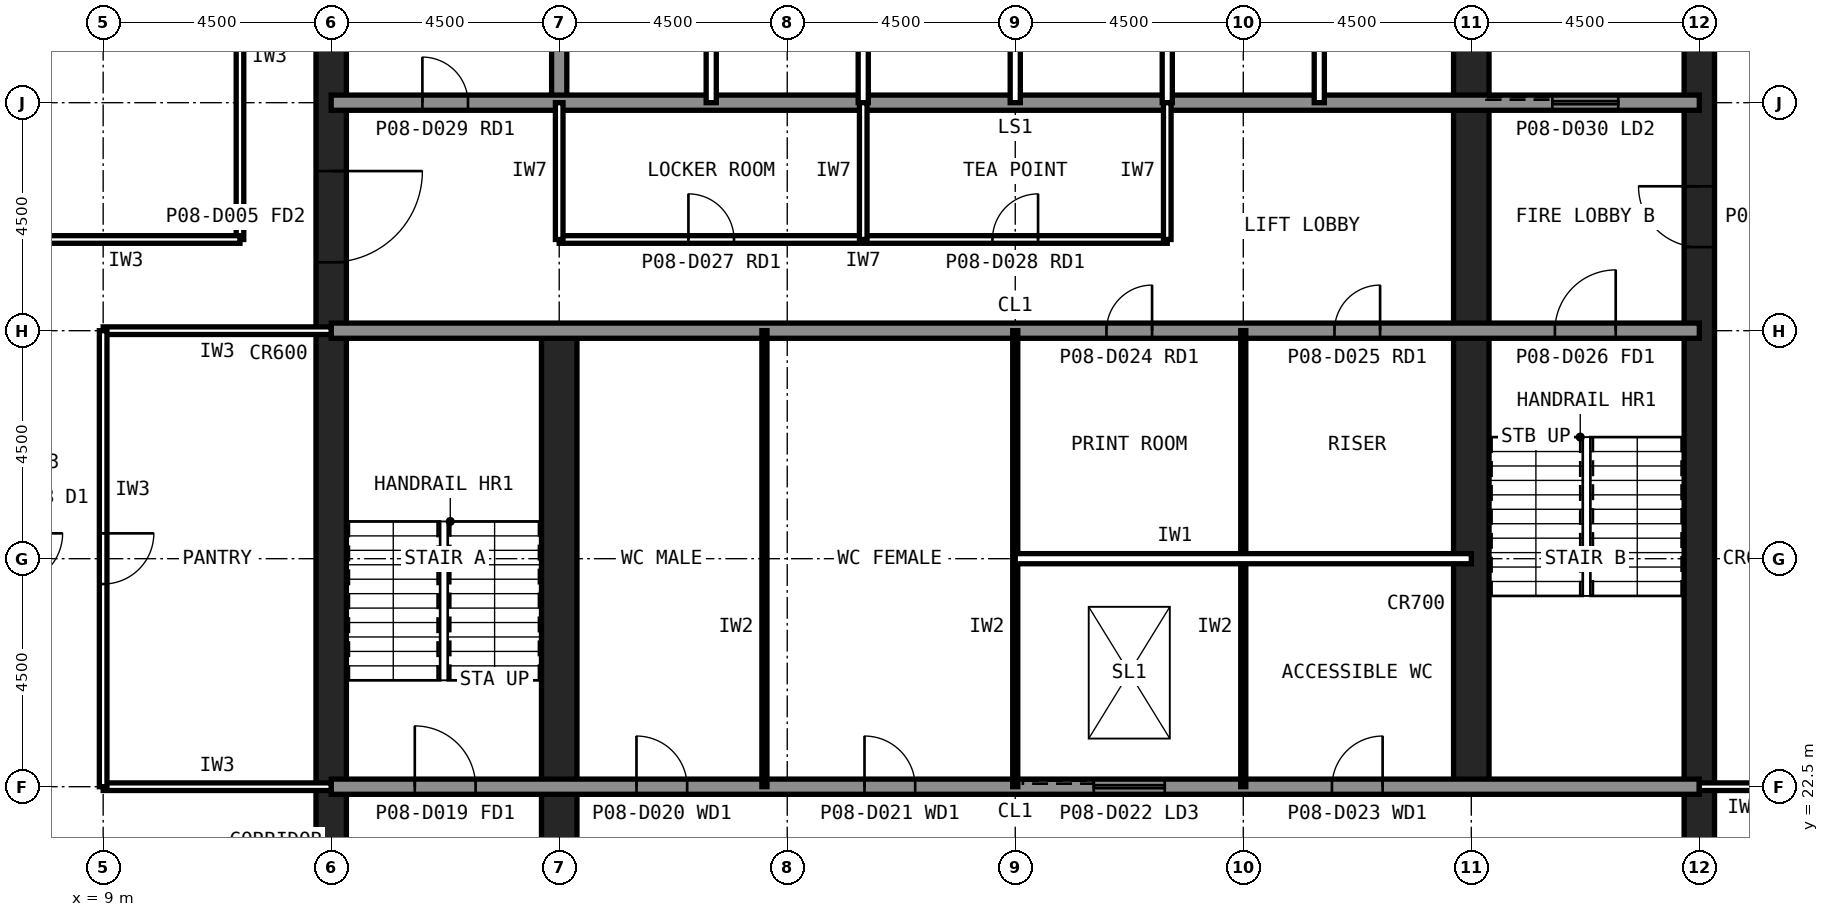
"""IFC4 building model, lengths in metres.
Left out: names, types, materials, properties, quantities, classifications, styles, units other than length and angle.
Written with IfcOpenShell. Run it as: python <this file> out.ifc"""

import sys

from ifc_helpers import new_model, si_unit, direction, frame, frame_2d, origin, place, context, subcontext, project, spatial, rectangle, extrude, element, fill, save


model = new_model("IFC4")
c1 = context("Model", 3, precision=1e-05, world=origin(), true_north=direction((0.0, 1.0)))
c2 = subcontext(c1, "Body", "Model", "MODEL_VIEW")
j1 = project(units=[si_unit("LENGTHUNIT", "METRE"), si_unit("PLANEANGLEUNIT", "RADIAN")], contexts=[c1])
p1 = place(None, origin())
s1 = spatial("IfcSite", under=j1, at=p1, CompositionType="ELEMENT")
p2 = place(p1, origin())
s2 = spatial("IfcBuilding", under=s1, at=p2, CompositionType="ELEMENT")
p3 = place(p2, frame((0.0, 0.0, 37.4)))
s3 = spatial("IfcBuildingStorey", under=s2, at=p3, CompositionType="ELEMENT", Elevation=37.4)
p4 = place(p3, frame((40.5, 13.5, 0.0), z_axis=(0.0, 0.0, 1.0), x_axis=(0.0, 1.0, 0.0)))
e1 = element("IfcWall", 1, at=p4, inside=s3, PredefinedType="SHEAR", context=c2, shape_type="SweptSolid", body=[
    extrude(rectangle(XDim=27.0, YDim=0.6, at=frame_2d((13.5, 0.0))), origin(), (0.0, 0.0, 1.0), 4.2),
])
p5 = place(p4, frame((5.85, 0.0, 0.0)))
e2 = element("IfcOpeningElement", 2, at=p5, cuts=e1, PredefinedType="OPENING", context=c2, shape_type="SweptSolid", body=[
    extrude(rectangle(XDim=1.8, YDim=2.1, at=frame_2d((0.9, 1.05))), frame((0.0, 0.31, 0.0), z_axis=(0.0, -1.0, 0.0), x_axis=(1.0, 0.0, 0.0)), (0.0, 0.0, 1.0), 0.62),
])
p6 = place(p4, frame((19.65, 0.0, 0.0)))
e3 = element("IfcOpeningElement", 3, at=p6, cuts=e1, PredefinedType="OPENING", context=c2, shape_type="SweptSolid", body=[
    extrude(rectangle(XDim=1.2, YDim=2.1, at=frame_2d((0.6, 1.05))), frame((0.0, 0.31, 0.0), z_axis=(0.0, -1.0, 0.0), x_axis=(1.0, 0.0, 0.0)), (0.0, 0.0, 1.0), 0.62),
])
p7 = place(p3, frame((13.5, 40.5, 0.0), z_axis=(0.0, 0.0, 1.0), x_axis=(0.0, -1.0, 0.0)))
e4 = element("IfcWall", 4, at=p7, inside=s3, PredefinedType="SHEAR", context=c2, shape_type="SweptSolid", body=[
    extrude(rectangle(XDim=27.0, YDim=0.6, at=frame_2d((13.5, 0.0))), origin(), (0.0, 0.0, 1.0), 4.2),
])
p8 = place(p7, frame((19.65, 0.0, 0.0)))
e5 = element("IfcOpeningElement", 5, at=p8, cuts=e4, PredefinedType="OPENING", context=c2, shape_type="SweptSolid", body=[
    extrude(rectangle(XDim=1.2, YDim=2.1, at=frame_2d((0.6, 1.05))), frame((0.0, 0.31, 0.0), z_axis=(0.0, -1.0, 0.0), x_axis=(1.0, 0.0, 0.0)), (0.0, 0.0, 1.0), 0.62),
])
p9 = place(p7, frame((5.85, 0.0, 0.0)))
e6 = element("IfcOpeningElement", 6, at=p9, cuts=e4, PredefinedType="OPENING", context=c2, shape_type="SweptSolid", body=[
    extrude(rectangle(XDim=1.8, YDim=2.1, at=frame_2d((0.9, 1.05))), frame((0.0, 0.31, 0.0), z_axis=(0.0, -1.0, 0.0), x_axis=(1.0, 0.0, 0.0)), (0.0, 0.0, 1.0), 0.62),
])
p10 = place(p3, frame((18.0, 13.5, 0.0), z_axis=(0.0, 0.0, 1.0), x_axis=(0.0, 1.0, 0.0)))
e7 = element("IfcWall", 7, at=p10, inside=s3, PredefinedType="SHEAR", context=c2, shape_type="SweptSolid", body=[
    extrude(rectangle(XDim=18.0, YDim=0.7, at=frame_2d((9.0, 0.0))), origin(), (0.0, 0.0, 1.0), 4.2),
])
p11 = place(p3, frame((18.0, 36.0, 0.0), z_axis=(0.0, 0.0, 1.0), x_axis=(0.0, 1.0, 0.0)))
e8 = element("IfcWall", 8, at=p11, inside=s3, PredefinedType="SOLIDWALL", context=c2, shape_type="SweptSolid", body=[
    extrude(rectangle(XDim=4.5, YDim=0.3, at=frame_2d((2.25, 0.0))), origin(), (0.0, 0.0, 1.0), 4.04),
])
p12 = place(p3, frame((36.0, 22.5, 0.0), z_axis=(0.0, 0.0, 1.0), x_axis=(0.0, 1.0, 0.0)))
e9 = element("IfcWall", 9, at=p12, inside=s3, PredefinedType="SHEAR", context=c2, shape_type="SweptSolid", body=[
    extrude(rectangle(XDim=18.0, YDim=0.7, at=frame_2d((9.0, 0.0))), origin(), (0.0, 0.0, 1.0), 4.2),
])
p13 = place(p3, frame((13.5, 36.0, 0.0), z_axis=(0.0, 0.0, 1.0), x_axis=(1.0, 0.0, 0.0)))
e10 = element("IfcWall", 10, at=p13, inside=s3, PredefinedType="SOLIDWALL", context=c2, shape_type="SweptSolid", body=[
    extrude(rectangle(XDim=27.0, YDim=0.3, at=frame_2d((13.5, 0.0))), origin(), (0.0, 0.0, 1.0), 4.04),
])
p14 = place(p13, frame((1.8, 0.0, 0.0)))
e11 = element("IfcOpeningElement", 11, at=p14, cuts=e10, PredefinedType="OPENING", context=c2, shape_type="SweptSolid", body=[
    extrude(rectangle(XDim=0.9, YDim=2.1, at=frame_2d((0.45, 1.05))), frame((0.0, 0.16, 0.0), z_axis=(0.0, -1.0, 0.0), x_axis=(1.0, 0.0, 0.0)), (0.0, 0.0, 1.0), 0.32),
])
p15 = place(p13, frame((24.1, 0.0, 0.0)))
e12 = element("IfcOpeningElement", 12, at=p15, cuts=e10, PredefinedType="OPENING", context=c2, shape_type="SweptSolid", body=[
    extrude(rectangle(XDim=1.3, YDim=2.2, at=frame_2d((0.65, 1.1))), frame((0.0, 0.16, 0.0), z_axis=(0.0, -1.0, 0.0), x_axis=(1.0, 0.0, 0.0)), (0.0, 0.0, 1.0), 0.32),
])
p16 = place(p3, frame((13.5, 22.5, 0.0), z_axis=(0.0, 0.0, 1.0), x_axis=(1.0, 0.0, 0.0)))
e13 = element("IfcWall", 13, at=p16, inside=s3, PredefinedType="SOLIDWALL", context=c2, shape_type="SweptSolid", body=[
    extrude(rectangle(XDim=27.0, YDim=0.3, at=frame_2d((13.5, 0.0))), origin(), (0.0, 0.0, 1.0), 4.04),
])
p17 = place(p16, frame((1.65, 0.0, 0.0)))
e14 = element("IfcOpeningElement", 14, at=p17, cuts=e13, PredefinedType="OPENING", context=c2, shape_type="SweptSolid", body=[
    extrude(rectangle(XDim=1.2, YDim=2.1, at=frame_2d((0.6, 1.05))), frame((0.0, 0.16, 0.0), z_axis=(0.0, -1.0, 0.0), x_axis=(1.0, 0.0, 0.0)), (0.0, 0.0, 1.0), 0.32),
])
p18 = place(p16, frame((6.025, 0.0, 0.0)))
e15 = element("IfcOpeningElement", 15, at=p18, cuts=e13, PredefinedType="OPENING", context=c2, shape_type="SweptSolid", body=[
    extrude(rectangle(XDim=1.0, YDim=2.1, at=frame_2d((0.5, 1.05))), frame((0.0, 0.16, 0.0), z_axis=(0.0, -1.0, 0.0), x_axis=(1.0, 0.0, 0.0)), (0.0, 0.0, 1.0), 0.32),
])
p19 = place(p16, frame((10.525, 0.0, 0.0)))
e16 = element("IfcOpeningElement", 16, at=p19, cuts=e13, PredefinedType="OPENING", context=c2, shape_type="SweptSolid", body=[
    extrude(rectangle(XDim=1.0, YDim=2.1, at=frame_2d((0.5, 1.05))), frame((0.0, 0.16, 0.0), z_axis=(0.0, -1.0, 0.0), x_axis=(1.0, 0.0, 0.0)), (0.0, 0.0, 1.0), 0.32),
])
p20 = place(p16, frame((19.75, 0.0, 0.0)))
e17 = element("IfcOpeningElement", 17, at=p20, cuts=e13, PredefinedType="OPENING", context=c2, shape_type="SweptSolid", body=[
    extrude(rectangle(XDim=1.0, YDim=2.1, at=frame_2d((0.5, 1.05))), frame((0.0, 0.16, 0.0), z_axis=(0.0, -1.0, 0.0), x_axis=(1.0, 0.0, 0.0)), (0.0, 0.0, 1.0), 0.32),
])
p21 = place(p16, frame((15.05, 0.0, 0.0)))
e18 = element("IfcOpeningElement", 18, at=p21, cuts=e13, PredefinedType="OPENING", context=c2, shape_type="SweptSolid", body=[
    extrude(rectangle(XDim=1.4, YDim=2.4, at=frame_2d((0.7, 1.2))), frame((0.0, 0.16, 0.0), z_axis=(0.0, -1.0, 0.0), x_axis=(1.0, 0.0, 0.0)), (0.0, 0.0, 1.0), 0.32),
])
p22 = place(p3, frame((13.5, 31.5, 0.0), z_axis=(0.0, 0.0, 1.0), x_axis=(1.0, 0.0, 0.0)))
e19 = element("IfcWall", 19, at=p22, inside=s3, PredefinedType="SOLIDWALL", context=c2, shape_type="SweptSolid", body=[
    extrude(rectangle(XDim=27.0, YDim=0.3, at=frame_2d((13.5, 0.0))), origin(), (0.0, 0.0, 1.0), 4.04),
])
p23 = place(p22, frame((24.15, 0.0, 0.0)))
e20 = element("IfcOpeningElement", 20, at=p23, cuts=e19, PredefinedType="OPENING", context=c2, shape_type="SweptSolid", body=[
    extrude(rectangle(XDim=1.2, YDim=2.1, at=frame_2d((0.6, 1.05))), frame((0.0, 0.16, 0.0), z_axis=(0.0, -1.0, 0.0), x_axis=(1.0, 0.0, 0.0)), (0.0, 0.0, 1.0), 0.32),
])
p24 = place(p22, frame((15.3, 0.0, 0.0)))
e21 = element("IfcOpeningElement", 21, at=p24, cuts=e19, PredefinedType="OPENING", context=c2, shape_type="SweptSolid", body=[
    extrude(rectangle(XDim=0.9, YDim=2.1, at=frame_2d((0.45, 1.05))), frame((0.0, 0.16, 0.0), z_axis=(0.0, -1.0, 0.0), x_axis=(1.0, 0.0, 0.0)), (0.0, 0.0, 1.0), 0.32),
])
p25 = place(p22, frame((19.8, 0.0, 0.0)))
e22 = element("IfcOpeningElement", 22, at=p25, cuts=e19, PredefinedType="OPENING", context=c2, shape_type="SweptSolid", body=[
    extrude(rectangle(XDim=0.9, YDim=2.1, at=frame_2d((0.45, 1.05))), frame((0.0, 0.16, 0.0), z_axis=(0.0, -1.0, 0.0), x_axis=(1.0, 0.0, 0.0)), (0.0, 0.0, 1.0), 0.32),
])
for number, where, z_axis, x_axis in (
    (23, (21.0, 36.0, 0.0), (0.0, 0.0, 1.0), (0.0, 1.0, 0.0)),
    (24, (24.0, 36.0, 0.0), (0.0, 0.0, 1.0), (0.0, 1.0, 0.0)),
    (25, (27.0, 36.0, 0.0), (0.0, 0.0, 1.0), (0.0, 1.0, 0.0)),
    (26, (30.0, 36.0, 0.0), (0.0, 0.0, 1.0), (0.0, 1.0, 0.0)),
    (27, (33.0, 36.0, 0.0), (0.0, 0.0, 1.0), (0.0, 1.0, 0.0)),
):
    element("IfcWall", number, at=place(p3, frame(where, z_axis=z_axis, x_axis=x_axis)), inside=s3, PredefinedType="PARTITIONING", context=c2, shape_type="SweptSolid", body=[
        extrude(rectangle(XDim=4.5, YDim=0.2, at=frame_2d((2.25, 0.0))), origin(), (0.0, 0.0, 1.0), 4.04),
    ])
for number, where, z_axis, x_axis in (
    (28, (22.05, 22.5, 0.0), (0.0, 0.0, 1.0), (0.0, 1.0, 0.0)),
    (29, (27.0, 22.5, 0.0), (0.0, 0.0, 1.0), (0.0, 1.0, 0.0)),
    (30, (31.5, 22.5, 0.0), (0.0, 0.0, 1.0), (0.0, 1.0, 0.0)),
):
    element("IfcWall", number, at=place(p3, frame(where, z_axis=z_axis, x_axis=x_axis)), inside=s3, PredefinedType="PLUMBINGWALL", context=c2, shape_type="SweptSolid", body=[
        extrude(rectangle(XDim=9.0, YDim=0.1, at=frame_2d((4.5, 0.0))), origin(), (0.0, 0.0, 1.0), 4.04),
    ])
p26 = place(p3, frame((27.0, 27.0, 0.0), z_axis=(0.0, 0.0, 1.0), x_axis=(1.0, 0.0, 0.0)))
e31 = element("IfcWall", 31, at=p26, inside=s3, PredefinedType="PARTITIONING", context=c2, shape_type="SweptSolid", body=[
    extrude(rectangle(XDim=9.0, YDim=0.2, at=frame_2d((4.5, 0.0))), origin(), (0.0, 0.0, 1.0), 4.04),
])
p27 = place(p3, frame((18.0, 33.3, 0.0), z_axis=(0.0, 0.0, 1.0), x_axis=(1.0, 0.0, 0.0)))
e32 = element("IfcWall", 32, at=p27, inside=s3, PredefinedType="PARTITIONING", context=c2, shape_type="SweptSolid", body=[
    extrude(rectangle(XDim=12.0, YDim=0.15, at=frame_2d((6.0, 0.0))), origin(), (0.0, 0.0, 1.0), 4.04),
])
p28 = place(p27, frame((2.55, 0.0, 0.0)))
e33 = element("IfcOpeningElement", 33, at=p28, cuts=e32, PredefinedType="OPENING", context=c2, shape_type="SweptSolid", body=[
    extrude(rectangle(XDim=0.9, YDim=2.1, at=frame_2d((0.45, 1.05))), frame((0.0, 0.085, 0.0), z_axis=(0.0, -1.0, 0.0), x_axis=(1.0, 0.0, 0.0)), (0.0, 0.0, 1.0), 0.17),
])
p29 = place(p27, frame((8.55, 0.0, 0.0)))
e34 = element("IfcOpeningElement", 34, at=p29, cuts=e32, PredefinedType="OPENING", context=c2, shape_type="SweptSolid", body=[
    extrude(rectangle(XDim=0.9, YDim=2.1, at=frame_2d((0.45, 1.05))), frame((0.0, 0.085, 0.0), z_axis=(0.0, -1.0, 0.0), x_axis=(1.0, 0.0, 0.0)), (0.0, 0.0, 1.0), 0.17),
])
for number, where, z_axis, x_axis in (
    (35, (18.0, 33.3, 0.0), (0.0, 0.0, 1.0), (0.0, 1.0, 0.0)),
    (36, (24.0, 33.3, 0.0), (0.0, 0.0, 1.0), (0.0, 1.0, 0.0)),
    (37, (30.0, 33.3, 0.0), (0.0, 0.0, 1.0), (0.0, 1.0, 0.0)),
):
    element("IfcWall", number, at=place(p3, frame(where, z_axis=z_axis, x_axis=x_axis)), inside=s3, PredefinedType="PARTITIONING", context=c2, shape_type="SweptSolid", body=[
        extrude(rectangle(XDim=2.7, YDim=0.15, at=frame_2d((1.35, 0.0))), origin(), (0.0, 0.0, 1.0), 4.04),
    ])
p30 = place(p3, frame((11.7, 40.5, 0.0), z_axis=(0.0, 0.0, 1.0), x_axis=(0.0, -1.0, 0.0)))
e38 = element("IfcWall", 38, at=p30, inside=s3, PredefinedType="PARTITIONING", context=c2, shape_type="SweptSolid", body=[
    extrude(rectangle(XDim=7.2, YDim=0.15, at=frame_2d((3.6, 0.0))), origin(), (0.0, 0.0, 1.0), 4.04),
])
p31 = place(p3, frame((11.7, 33.3, 0.0), z_axis=(0.0, 0.0, 1.0), x_axis=(-1.0, 0.0, 0.0)))
e39 = element("IfcWall", 39, at=p31, inside=s3, PredefinedType="PARTITIONING", context=c2, shape_type="SweptSolid", body=[
    extrude(rectangle(XDim=4.5, YDim=0.15, at=frame_2d((2.25, 0.0))), origin(), (0.0, 0.0, 1.0), 4.04),
])
p32 = place(p3, frame((42.3, 22.5, 0.0), z_axis=(0.0, 0.0, 1.0), x_axis=(-1.0, 0.0, 0.0)))
e40 = element("IfcWall", 40, at=p32, inside=s3, PredefinedType="PARTITIONING", context=c2, shape_type="SweptSolid", body=[
    extrude(rectangle(XDim=1.8, YDim=0.15, at=frame_2d((0.9, 0.0))), origin(), (0.0, 0.0, 1.0), 3.189),
])
for number, where, z_axis, x_axis in (
    (41, (9.0, 22.5, 0.0), (0.0, 0.0, 1.0), (1.0, 0.0, 0.0)),
    (42, (13.5, 31.5, 0.0), (0.0, 0.0, 1.0), (-1.0, 0.0, 0.0)),
):
    element("IfcWall", number, at=place(p3, frame(where, z_axis=z_axis, x_axis=x_axis)), inside=s3, PredefinedType="PARTITIONING", context=c2, shape_type="SweptSolid", body=[
        extrude(rectangle(XDim=4.5, YDim=0.15, at=frame_2d((2.25, 0.0))), origin(), (0.0, 0.0, 1.0), 3.189),
    ])
p33 = place(p3, frame((9.0, 31.5, 0.0), z_axis=(0.0, 0.0, 1.0), x_axis=(0.0, -1.0, 0.0)))
e43 = element("IfcWall", 43, at=p33, inside=s3, PredefinedType="PARTITIONING", context=c2, shape_type="SweptSolid", body=[
    extrude(rectangle(XDim=9.0, YDim=0.15, at=frame_2d((4.5, 0.0))), origin(), (0.0, 0.0, 1.0), 4.04),
])
p34 = place(p33, frame((4.0, 0.0, 0.0)))
e44 = element("IfcOpeningElement", 44, at=p34, cuts=e43, PredefinedType="OPENING", context=c2, shape_type="SweptSolid", body=[
    extrude(rectangle(XDim=1.0, YDim=2.1, at=frame_2d((0.5, 1.05))), frame((0.0, 0.085, 0.0), z_axis=(0.0, -1.0, 0.0), x_axis=(1.0, 0.0, 0.0)), (0.0, 0.0, 1.0), 0.17),
])
p35 = place(p9, origin())
e45 = element("IfcDoor", 45, at=p35, inside=s3, OperationType="SINGLE_SWING_LEFT", PredefinedType="DOOR", context=c2, shape_type="SweptSolid", body=[
    extrude(rectangle(XDim=1.8, YDim=2.1, at=frame_2d((0.9, 1.05))), frame((0.0, 0.025, 0.0), z_axis=(0.0, -1.0, 0.0), x_axis=(1.0, 0.0, 0.0)), (0.0, 0.0, 1.0), 0.05),
])
fill(e6, e45)
p36 = place(p6, origin())
e46 = element("IfcDoor", 46, at=p36, inside=s3, OperationType="SINGLE_SWING_RIGHT", PredefinedType="DOOR", context=c2, shape_type="SweptSolid", body=[
    extrude(rectangle(XDim=1.2, YDim=2.1, at=frame_2d((0.6, 1.05))), frame((0.0, 0.025, 0.0), z_axis=(0.0, -1.0, 0.0), x_axis=(1.0, 0.0, 0.0)), (0.0, 0.0, 1.0), 0.05),
])
fill(e3, e46)
p37 = place(p17, origin())
e47 = element("IfcDoor", 47, at=p37, inside=s3, OperationType="SINGLE_SWING_LEFT", PredefinedType="DOOR", context=c2, shape_type="SweptSolid", body=[
    extrude(rectangle(XDim=1.2, YDim=2.1, at=frame_2d((0.6, 1.05))), frame((0.0, 0.025, 0.0), z_axis=(0.0, -1.0, 0.0), x_axis=(1.0, 0.0, 0.0)), (0.0, 0.0, 1.0), 0.05),
])
fill(e14, e47)
p38 = place(p23, origin())
e48 = element("IfcDoor", 48, at=p38, inside=s3, OperationType="SINGLE_SWING_RIGHT", PredefinedType="DOOR", context=c2, shape_type="SweptSolid", body=[
    extrude(rectangle(XDim=1.2, YDim=2.1, at=frame_2d((0.6, 1.05))), frame((0.0, 0.025, 0.0), z_axis=(0.0, -1.0, 0.0), x_axis=(1.0, 0.0, 0.0)), (0.0, 0.0, 1.0), 0.05),
])
fill(e20, e48)
p39 = place(p18, origin())
e49 = element("IfcDoor", 49, at=p39, inside=s3, OperationType="SINGLE_SWING_LEFT", PredefinedType="DOOR", context=c2, shape_type="SweptSolid", body=[
    extrude(rectangle(XDim=1.0, YDim=2.1, at=frame_2d((0.5, 1.05))), frame((0.0, 0.025, 0.0), z_axis=(0.0, -1.0, 0.0), x_axis=(1.0, 0.0, 0.0)), (0.0, 0.0, 1.0), 0.05),
])
fill(e15, e49)
p40 = place(p19, origin())
e50 = element("IfcDoor", 50, at=p40, inside=s3, OperationType="SINGLE_SWING_LEFT", PredefinedType="DOOR", context=c2, shape_type="SweptSolid", body=[
    extrude(rectangle(XDim=1.0, YDim=2.1, at=frame_2d((0.5, 1.05))), frame((0.0, 0.025, 0.0), z_axis=(0.0, -1.0, 0.0), x_axis=(1.0, 0.0, 0.0)), (0.0, 0.0, 1.0), 0.05),
])
fill(e16, e50)
p41 = place(p20, origin())
e51 = element("IfcDoor", 51, at=p41, inside=s3, OperationType="SINGLE_SWING_RIGHT", PredefinedType="DOOR", context=c2, shape_type="SweptSolid", body=[
    extrude(rectangle(XDim=1.0, YDim=2.1, at=frame_2d((0.5, 1.05))), frame((0.0, 0.025, 0.0), z_axis=(0.0, -1.0, 0.0), x_axis=(1.0, 0.0, 0.0)), (0.0, 0.0, 1.0), 0.05),
])
fill(e17, e51)
p42 = place(p24, origin())
e52 = element("IfcDoor", 52, at=p42, inside=s3, OperationType="SINGLE_SWING_RIGHT", PredefinedType="DOOR", context=c2, shape_type="SweptSolid", body=[
    extrude(rectangle(XDim=0.9, YDim=2.1, at=frame_2d((0.45, 1.05))), frame((0.0, 0.025, 0.0), z_axis=(0.0, -1.0, 0.0), x_axis=(1.0, 0.0, 0.0)), (0.0, 0.0, 1.0), 0.05),
])
fill(e21, e52)
p43 = place(p25, origin())
e53 = element("IfcDoor", 53, at=p43, inside=s3, OperationType="SINGLE_SWING_RIGHT", PredefinedType="DOOR", context=c2, shape_type="SweptSolid", body=[
    extrude(rectangle(XDim=0.9, YDim=2.1, at=frame_2d((0.45, 1.05))), frame((0.0, 0.025, 0.0), z_axis=(0.0, -1.0, 0.0), x_axis=(1.0, 0.0, 0.0)), (0.0, 0.0, 1.0), 0.05),
])
fill(e22, e53)
p44 = place(p14, origin())
e54 = element("IfcDoor", 54, at=p44, inside=s3, OperationType="SINGLE_SWING_LEFT", PredefinedType="DOOR", context=c2, shape_type="SweptSolid", body=[
    extrude(rectangle(XDim=0.9, YDim=2.1, at=frame_2d((0.45, 1.05))), frame((0.0, 0.025, 0.0), z_axis=(0.0, -1.0, 0.0), x_axis=(1.0, 0.0, 0.0)), (0.0, 0.0, 1.0), 0.05),
])
fill(e11, e54)
p45 = place(p28, origin())
e55 = element("IfcDoor", 55, at=p45, inside=s3, OperationType="SINGLE_SWING_LEFT", PredefinedType="DOOR", context=c2, shape_type="SweptSolid", body=[
    extrude(rectangle(XDim=0.9, YDim=2.1, at=frame_2d((0.45, 1.05))), frame((0.0, 0.025, 0.0), z_axis=(0.0, -1.0, 0.0), x_axis=(1.0, 0.0, 0.0)), (0.0, 0.0, 1.0), 0.05),
])
fill(e33, e55)
p46 = place(p29, origin())
e56 = element("IfcDoor", 56, at=p46, inside=s3, OperationType="SINGLE_SWING_RIGHT", PredefinedType="DOOR", context=c2, shape_type="SweptSolid", body=[
    extrude(rectangle(XDim=0.9, YDim=2.1, at=frame_2d((0.45, 1.05))), frame((0.0, 0.025, 0.0), z_axis=(0.0, -1.0, 0.0), x_axis=(1.0, 0.0, 0.0)), (0.0, 0.0, 1.0), 0.05),
])
fill(e34, e56)
p47 = place(p15, origin())
e57 = element("IfcDoor", 57, at=p47, inside=s3, OperationType="SLIDING_TO_LEFT", PredefinedType="DOOR", context=c2, shape_type="SweptSolid", body=[
    extrude(rectangle(XDim=1.3, YDim=2.2, at=frame_2d((0.65, 1.1))), frame((0.0, 0.025, 0.0), z_axis=(0.0, -1.0, 0.0), x_axis=(1.0, 0.0, 0.0)), (0.0, 0.0, 1.0), 0.05),
])
fill(e12, e57)
p48 = place(p21, origin())
e58 = element("IfcDoor", 58, at=p48, inside=s3, OperationType="SLIDING_TO_LEFT", PredefinedType="DOOR", context=c2, shape_type="SweptSolid", body=[
    extrude(rectangle(XDim=1.4, YDim=2.4, at=frame_2d((0.7, 1.2))), frame((0.0, 0.025, 0.0), z_axis=(0.0, -1.0, 0.0), x_axis=(1.0, 0.0, 0.0)), (0.0, 0.0, 1.0), 0.05),
])
fill(e18, e58)
p49 = place(p34, origin())
e59 = element("IfcDoor", 59, at=p49, inside=s3, OperationType="SINGLE_SWING_LEFT", PredefinedType="DOOR", context=c2, shape_type="SweptSolid", body=[
    extrude(rectangle(XDim=1.0, YDim=2.1, at=frame_2d((0.5, 1.05))), frame((0.0, 0.025, 0.0), z_axis=(0.0, -1.0, 0.0), x_axis=(1.0, 0.0, 0.0)), (0.0, 0.0, 1.0), 0.05),
])
fill(e44, e59)
save(model, sys.argv[1])
